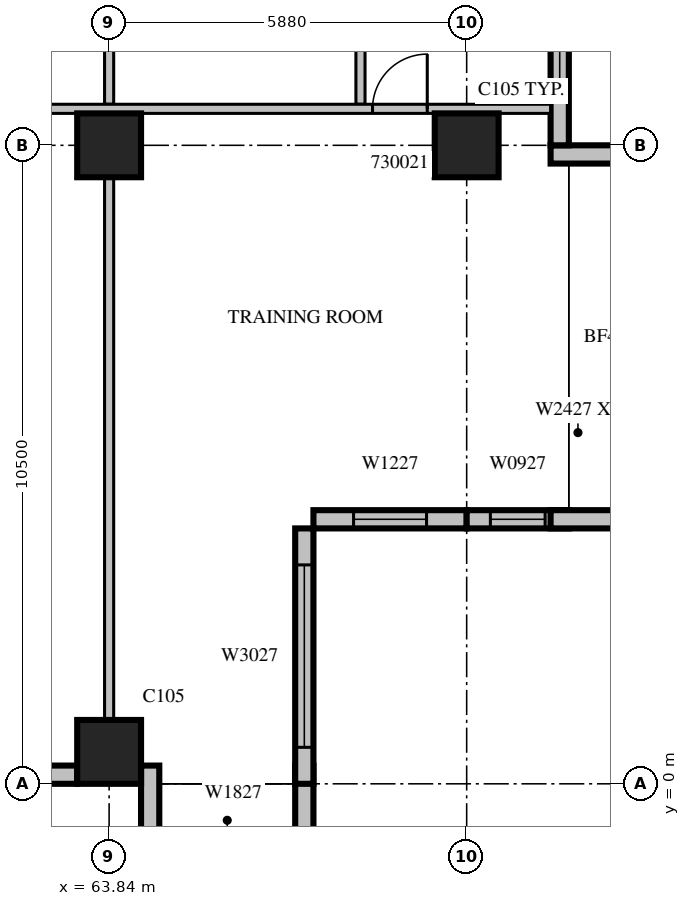
"""IFC4 building model, lengths in metres.
Left out: names, types, materials, properties, quantities, classifications, styles, units other than length and angle.
Written with IfcOpenShell. Run it as: python <this file> out.ifc"""

import sys

from ifc_helpers import new_model, si_unit, direction, frame, frame_2d, origin, origin_2d, place, context, subcontext, project, spatial, rectangle, extrude, source, transform, mapped, element, fill, save


model = new_model("IFC4")
c1 = context("Model", 3, precision=1e-05, world=origin(), true_north=direction((0.0, 1.0)))
c2 = subcontext(c1, "Body", "Model", "MODEL_VIEW")
j1 = project(units=[si_unit("LENGTHUNIT", "METRE"), si_unit("PLANEANGLEUNIT", "RADIAN")], contexts=[c1])
p1 = place(None, origin())
s1 = spatial("IfcSite", under=j1, at=p1, CompositionType="ELEMENT")
p2 = place(p1, origin())
s2 = spatial("IfcBuilding", under=s1, at=p2, CompositionType="ELEMENT")
p3 = place(p2, frame((0.0, 0.0, 137.1)))
s3 = spatial("IfcBuildingStorey", under=s2, at=p3, CompositionType="ELEMENT", Elevation=137.1)
m1 = source(origin(), c2, "Body", "SweptSolid", [
    extrude(rectangle(XDim=1.05, YDim=1.05, at=origin_2d()), origin(), (0.0, 0.0, 1.0), 4.2),
])
for number, where, z_axis, x_axis in (
    (1, (63.84, 0.525, 0.0), (0.0, 0.0, 1.0), (1.0, 0.0, 0.0)),
    (2, (63.84, 10.5, 0.0), (0.0, 0.0, 1.0), (1.0, 0.0, 0.0)),
    (3, (69.72, 10.5, 0.0), (0.0, 0.0, 1.0), (1.0, 0.0, 0.0)),
):
    element("IfcColumn", number, at=place(p3, frame(where, z_axis=z_axis, x_axis=x_axis)), inside=s3, PredefinedType="COLUMN", context=c2, shape_type="MappedRepresentation", body=[
        mapped(m1, transform((0.0, 0.0, 0.0), scale=1.0)),
    ])
m2 = source(origin(), c2, "Body", "SweptSolid", [
    extrude(rectangle(XDim=4.83, YDim=0.3, at=frame_2d((2.415, 0.0))), origin(), (0.0, 0.0, 1.0), 3.8),
])
p4 = place(p3, frame((58.485, 0.15, 0.0), z_axis=(0.0, 0.0, 1.0), x_axis=(1.0, 0.0, 0.0)))
e4 = element("IfcWall", 4, at=p4, inside=s3, PredefinedType="STANDARD", context=c2, shape_type="MappedRepresentation", body=[
    mapped(m2, transform((0.0, 0.0, 0.0), scale=1.0)),
])
m3 = source(origin(), c2, "Body", "SweptSolid", [
    extrude(rectangle(XDim=1.8, YDim=2.7, at=frame_2d((0.9, 1.35))), frame((0.0, 0.16, 0.0), z_axis=(0.0, -1.0, 0.0), x_axis=(1.0, 0.0, 0.0)), (0.0, 0.0, 1.0), 0.32),
])
p5 = place(p4, frame((0.953, 0.0, 0.6)))
e5 = element("IfcOpeningElement", 5, at=p5, cuts=e4, PredefinedType="OPENING", context=c2, shape_type="MappedRepresentation", body=[
    mapped(m3, transform((0.0, 0.0, 0.0), scale=1.0)),
])
m4 = source(origin(), c2, "Body", "SweptSolid", [
    extrude(rectangle(XDim=1.2, YDim=0.3, at=frame_2d((0.6, 0.0))), origin(), (0.0, 0.0, 1.0), 3.8),
])
for number, where, z_axis, x_axis in (
    (6, (64.515, 0.3, 0.0), (0.0, 0.0, 1.0), (0.0, -1.0, 0.0)),
    (7, (67.05, 0.3, 0.0), (0.0, 0.0, 1.0), (0.0, -1.0, 0.0)),
):
    element("IfcWall", number, at=place(p3, frame(where, z_axis=z_axis, x_axis=x_axis)), inside=s3, PredefinedType="STANDARD", context=c2, shape_type="MappedRepresentation", body=[
        mapped(m4, transform((0.0, 0.0, 0.0), scale=1.0)),
    ])
m5 = source(origin(), c2, "Body", "SweptSolid", [
    extrude(rectangle(XDim=4.2, YDim=0.3, at=frame_2d((2.1, 0.0))), origin(), (0.0, 0.0, 1.0), 3.8),
])
p6 = place(p3, frame((67.05, 0.0, 0.0), z_axis=(0.0, 0.0, 1.0), x_axis=(0.0, 1.0, 0.0)))
e8 = element("IfcWall", 8, at=p6, inside=s3, PredefinedType="STANDARD", context=c2, shape_type="MappedRepresentation", body=[
    mapped(m5, transform((0.0, 0.0, 0.0), scale=1.0)),
])
m6 = source(origin(), c2, "Body", "SweptSolid", [
    extrude(rectangle(XDim=3.0, YDim=2.7, at=frame_2d((1.5, 1.35))), frame((0.0, 0.16, 0.0), z_axis=(0.0, -1.0, 0.0), x_axis=(1.0, 0.0, 0.0)), (0.0, 0.0, 1.0), 0.32),
])
p7 = place(p6, frame((0.6, 0.0, 0.6)))
e9 = element("IfcOpeningElement", 9, at=p7, cuts=e8, PredefinedType="OPENING", context=c2, shape_type="MappedRepresentation", body=[
    mapped(m6, transform((0.0, 0.0, 0.0), scale=1.0)),
])
m7 = source(origin(), c2, "Body", "SweptSolid", [
    extrude(rectangle(XDim=2.52, YDim=0.3, at=frame_2d((1.26, 0.0))), origin(), (0.0, 0.0, 1.0), 3.8),
])
p8 = place(p3, frame((67.2, 4.35, 0.0), z_axis=(0.0, 0.0, 1.0), x_axis=(1.0, 0.0, 0.0)))
e10 = element("IfcWall", 10, at=p8, inside=s3, PredefinedType="STANDARD", context=c2, shape_type="MappedRepresentation", body=[
    mapped(m7, transform((0.0, 0.0, 0.0), scale=1.0)),
])
m8 = source(origin(), c2, "Body", "SweptSolid", [
    extrude(rectangle(XDim=1.2, YDim=2.7, at=frame_2d((0.6, 1.35))), frame((0.0, 0.16, 0.0), z_axis=(0.0, -1.0, 0.0), x_axis=(1.0, 0.0, 0.0)), (0.0, 0.0, 1.0), 0.32),
])
p9 = place(p8, frame((0.66, 0.0, 0.6)))
e11 = element("IfcOpeningElement", 11, at=p9, cuts=e10, PredefinedType="OPENING", context=c2, shape_type="MappedRepresentation", body=[
    mapped(m8, transform((0.0, 0.0, 0.0), scale=1.0)),
])
m9 = source(origin(), c2, "Body", "SweptSolid", [
    extrude(rectangle(XDim=1.68, YDim=0.3, at=frame_2d((0.84, 0.0))), origin(), (0.0, 0.0, 1.0), 3.8),
])
p10 = place(p3, frame((69.72, 4.35, 0.0), z_axis=(0.0, 0.0, 1.0), x_axis=(1.0, 0.0, 0.0)))
e12 = element("IfcWall", 12, at=p10, inside=s3, PredefinedType="STANDARD", context=c2, shape_type="MappedRepresentation", body=[
    mapped(m9, transform((0.0, 0.0, 0.0), scale=1.0)),
])
m10 = source(origin(), c2, "Body", "SweptSolid", [
    extrude(rectangle(XDim=0.9, YDim=2.7, at=frame_2d((0.45, 1.35))), frame((0.0, 0.16, 0.0), z_axis=(0.0, -1.0, 0.0), x_axis=(1.0, 0.0, 0.0)), (0.0, 0.0, 1.0), 0.32),
])
p11 = place(p10, frame((0.39, 0.0, 0.6)))
e13 = element("IfcOpeningElement", 13, at=p11, cuts=e12, PredefinedType="OPENING", context=c2, shape_type="MappedRepresentation", body=[
    mapped(m10, transform((0.0, 0.0, 0.0), scale=1.0)),
])
for number, where, z_axis, x_axis in (
    (14, (71.1, 4.35, 0.0), (0.0, 0.0, 1.0), (1.0, 0.0, 0.0)),
    (15, (71.1, 10.35, 0.0), (0.0, 0.0, 1.0), (1.0, 0.0, 0.0)),
):
    element("IfcWall", number, at=place(p3, frame(where, z_axis=z_axis, x_axis=x_axis)), inside=s3, PredefinedType="STANDARD", context=c2, shape_type="MappedRepresentation", body=[
        mapped(m4, transform((0.0, 0.0, 0.0), scale=1.0)),
    ])
m11 = source(origin(), c2, "Body", "SweptSolid", [
    extrude(rectangle(XDim=6.3, YDim=0.3, at=frame_2d((3.15, 0.0))), origin(), (0.0, 0.0, 1.0), 3.8),
])
p12 = place(p3, frame((71.25, 10.5, 0.0), z_axis=(0.0, 0.0, 1.0), x_axis=(0.0, 1.0, 0.0)))
e16 = element("IfcWall", 16, at=p12, inside=s3, PredefinedType="STANDARD", context=c2, shape_type="MappedRepresentation", body=[
    mapped(m11, transform((0.0, 0.0, 0.0), scale=1.0)),
])
p13 = place(p12, frame((1.025, 0.0, 0.6)))
e17 = element("IfcOpeningElement", 17, at=p13, cuts=e16, PredefinedType="OPENING", context=c2, shape_type="MappedRepresentation", body=[
    mapped(m8, transform((0.0, 0.0, 0.0), scale=1.0)),
])
m12 = source(origin(), c2, "Body", "SweptSolid", [
    extrude(rectangle(XDim=3.525, YDim=0.15, at=frame_2d((1.762, 0.0))), origin(), (0.0, 0.0, 1.0), 3.8),
])
p14 = place(p3, frame((67.974, 11.175, 0.0), z_axis=(0.0, 0.0, 1.0), x_axis=(0.0, 1.0, 0.0)))
e18 = element("IfcWall", 18, at=p14, inside=s3, PredefinedType="PARTITIONING", context=c2, shape_type="MappedRepresentation", body=[
    mapped(m12, transform((0.0, 0.0, 0.0), scale=1.0)),
])
m13 = source(origin(), c2, "Body", "SweptSolid", [
    extrude(rectangle(XDim=8.927, YDim=0.15, at=frame_2d((4.463, 0.0))), origin(), (0.0, 0.0, 1.0), 3.8),
])
p15 = place(p3, frame((63.84, 1.049, 0.0), z_axis=(0.0, 0.0, 1.0), x_axis=(0.0, 1.0, 0.0)))
e19 = element("IfcWall", 19, at=p15, inside=s3, PredefinedType="PARTITIONING", context=c2, shape_type="MappedRepresentation", body=[
    mapped(m13, transform((0.0, 0.0, 0.0), scale=1.0)),
])
p16 = place(p3, frame((63.84, 11.175, 0.0), z_axis=(0.0, 0.0, 1.0), x_axis=(0.0, 1.0, 0.0)))
e20 = element("IfcWall", 20, at=p16, inside=s3, PredefinedType="PARTITIONING", context=c2, shape_type="MappedRepresentation", body=[
    mapped(m12, transform((0.0, 0.0, 0.0), scale=1.0)),
])
m14 = source(origin(), c2, "Body", "SweptSolid", [
    extrude(rectangle(XDim=24.9, YDim=0.15, at=frame_2d((12.45, 0.0))), origin(), (0.0, 0.0, 1.0), 3.8),
])
p17 = place(p3, frame((71.1, 11.1, 0.0), z_axis=(0.0, 0.0, 1.0), x_axis=(-1.0, 0.0, 0.0)))
e21 = element("IfcWall", 21, at=p17, inside=s3, PredefinedType="PARTITIONING", context=c2, shape_type="MappedRepresentation", body=[
    mapped(m14, transform((0.0, 0.0, 0.0), scale=1.0)),
])
m15 = source(origin(), c2, "Body", "SweptSolid", [
    extrude(rectangle(XDim=1.1, YDim=2.1, at=frame_2d((0.55, 1.05))), frame((0.0, 0.085, 0.0), z_axis=(0.0, -1.0, 0.0), x_axis=(1.0, 0.0, 0.0)), (0.0, 0.0, 1.0), 0.17),
])
p18 = place(p17, frame((19.988, 0.0, 0.0)))
e22 = element("IfcOpeningElement", 22, at=p18, cuts=e21, PredefinedType="OPENING", context=c2, shape_type="MappedRepresentation", body=[
    mapped(m15, transform((0.0, 0.0, 0.0), scale=1.0)),
])
p19 = place(p17, frame((16.497, 0.0, 0.0)))
e23 = element("IfcOpeningElement", 23, at=p19, cuts=e21, PredefinedType="OPENING", context=c2, shape_type="MappedRepresentation", body=[
    mapped(m15, transform((0.0, 0.0, 0.0), scale=1.0)),
])
m16 = source(origin(), c2, "Body", "SweptSolid", [
    extrude(rectangle(XDim=0.9, YDim=2.1, at=frame_2d((0.45, 1.05))), frame((0.0, 0.085, 0.0), z_axis=(0.0, -1.0, 0.0), x_axis=(1.0, 0.0, 0.0)), (0.0, 0.0, 1.0), 0.17),
])
p20 = place(p17, frame((2.028, 0.0, 0.0)))
e24 = element("IfcOpeningElement", 24, at=p20, cuts=e21, PredefinedType="OPENING", context=c2, shape_type="MappedRepresentation", body=[
    mapped(m16, transform((0.0, 0.0, 0.0), scale=1.0)),
])
m17 = source(origin(), c2, "Body", "SweptSolid", [
    extrude(rectangle(XDim=3.0, YDim=2.7, at=frame_2d((1.5, 1.35))), frame((0.0, 0.03, 0.0), z_axis=(0.0, -1.0, 0.0), x_axis=(1.0, 0.0, 0.0)), (0.0, 0.0, 1.0), 0.06),
])
p21 = place(p7, origin())
e25 = element("IfcWindow", 25, at=p21, inside=s3, PartitioningType="SINGLE_PANEL", PredefinedType="WINDOW", context=c2, shape_type="MappedRepresentation", body=[
    mapped(m17, transform((0.0, 0.0, 0.0), scale=1.0)),
])
fill(e9, e25)
m18 = source(origin(), c2, "Body", "SweptSolid", [
    extrude(rectangle(XDim=1.2, YDim=2.7, at=frame_2d((0.6, 1.35))), frame((0.0, 0.03, 0.0), z_axis=(0.0, -1.0, 0.0), x_axis=(1.0, 0.0, 0.0)), (0.0, 0.0, 1.0), 0.06),
])
p22 = place(p9, origin())
e26 = element("IfcWindow", 26, at=p22, inside=s3, PartitioningType="SINGLE_PANEL", PredefinedType="WINDOW", context=c2, shape_type="MappedRepresentation", body=[
    mapped(m18, transform((0.0, 0.0, 0.0), scale=1.0)),
])
fill(e11, e26)
m19 = source(origin(), c2, "Body", "SweptSolid", [
    extrude(rectangle(XDim=0.9, YDim=2.7, at=frame_2d((0.45, 1.35))), frame((0.0, 0.03, 0.0), z_axis=(0.0, -1.0, 0.0), x_axis=(1.0, 0.0, 0.0)), (0.0, 0.0, 1.0), 0.06),
])
p23 = place(p11, origin())
e27 = element("IfcWindow", 27, at=p23, inside=s3, PartitioningType="SINGLE_PANEL", PredefinedType="WINDOW", context=c2, shape_type="MappedRepresentation", body=[
    mapped(m19, transform((0.0, 0.0, 0.0), scale=1.0)),
])
fill(e13, e27)
p24 = place(p13, origin())
e28 = element("IfcWindow", 28, at=p24, inside=s3, PartitioningType="SINGLE_PANEL", PredefinedType="WINDOW", context=c2, shape_type="MappedRepresentation", body=[
    mapped(m18, transform((0.0, 0.0, 0.0), scale=1.0)),
])
fill(e17, e28)
m20 = source(origin(), c2, "Body", "SweptSolid", [
    extrude(rectangle(XDim=0.9, YDim=2.1, at=frame_2d((0.45, 1.05))), frame((0.0, 0.025, 0.0), z_axis=(0.0, -1.0, 0.0), x_axis=(1.0, 0.0, 0.0)), (0.0, 0.0, 1.0), 0.05),
])
p25 = place(p20, origin())
e29 = element("IfcDoor", 29, at=p25, inside=s3, OperationType="SINGLE_SWING_RIGHT", PredefinedType="DOOR", context=c2, shape_type="MappedRepresentation", body=[
    mapped(m20, transform((0.0, 0.0, 0.0), scale=1.0)),
])
fill(e24, e29)
save(model, sys.argv[1])
